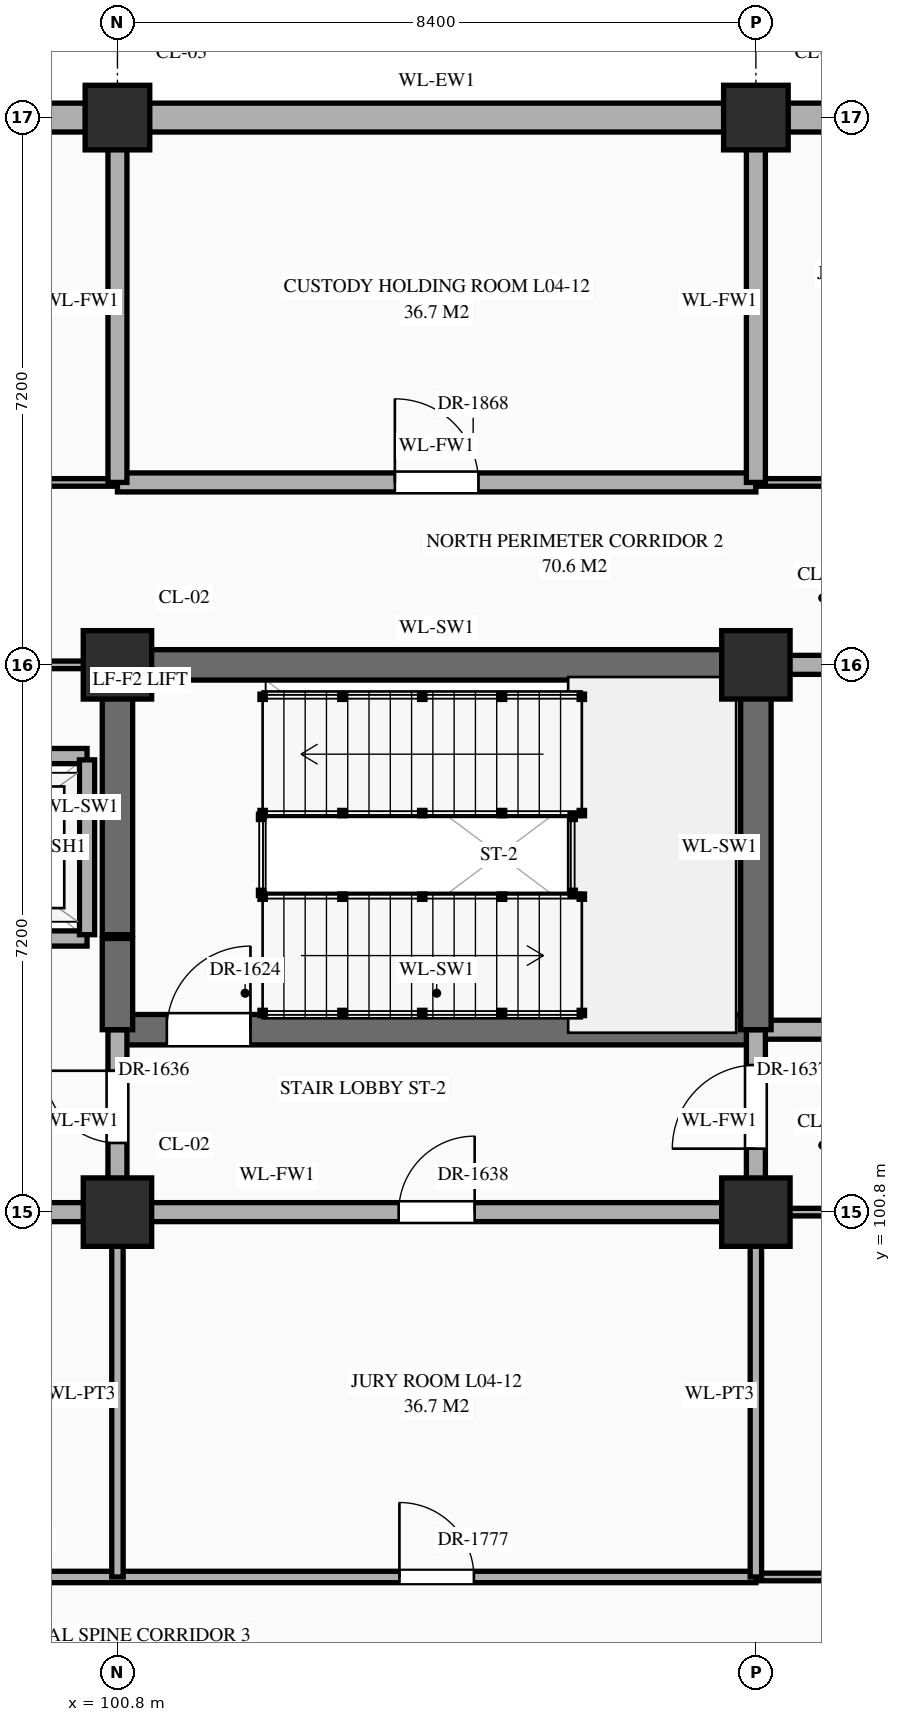
"""IFC4 building model, lengths in metres.
Left out: names, types, materials, properties, quantities, classifications, styles, units other than length and angle.
Written with IfcOpenShell. Run it as: python <this file> out.ifc"""

import sys

from ifc_helpers import new_model, si_unit, direction, frame, frame_2d, origin, origin_2d, place, context, subcontext, project, spatial, rectangle, extrude, element, fill, save


model = new_model("IFC4")
c1 = context("Model", 3, precision=1e-05, world=origin(), true_north=direction((0.0, 1.0)))
c2 = subcontext(c1, "Body", "Model", "MODEL_VIEW")
j1 = project(units=[si_unit("LENGTHUNIT", "METRE"), si_unit("PLANEANGLEUNIT", "RADIAN")], contexts=[c1])
p1 = place(None, origin())
s1 = spatial("IfcSite", under=j1, at=p1, CompositionType="ELEMENT")
p2 = place(p1, origin())
s2 = spatial("IfcBuilding", under=s1, at=p2, CompositionType="ELEMENT")
p3 = place(p2, frame((0.0, 0.0, 16.2)))
s3 = spatial("IfcBuildingStorey", under=s2, at=p3, CompositionType="ELEMENT", Elevation=16.2)
for number, where, z_axis, x_axis in (
    (1, (100.8, 100.8, 0.0), (0.0, 0.0, 1.0), (1.0, 0.0, 0.0)),
    (2, (100.8, 108.0, 0.0), (0.0, 0.0, 1.0), (1.0, 0.0, 0.0)),
):
    element("IfcColumn", number, at=place(p3, frame(where, z_axis=z_axis, x_axis=x_axis)), inside=s3, PredefinedType="COLUMN", context=c2, shape_type="SweptSolid", body=[
        extrude(rectangle(XDim=0.9, YDim=0.9, at=origin_2d()), origin(), (0.0, 0.0, 1.0), 5.4),
    ])
p4 = place(p3, frame((100.8, 115.2, 0.0), z_axis=(0.0, 0.0, 1.0), x_axis=(1.0, 0.0, 0.0)))
e3 = element("IfcColumn", 3, at=p4, inside=s3, PredefinedType="COLUMN", context=c2, shape_type="SweptSolid", body=[
    extrude(rectangle(XDim=0.85, YDim=0.85, at=origin_2d()), origin(), (0.0, 0.0, 1.0), 5.4),
])
for number, where, z_axis, x_axis in (
    (4, (109.2, 100.8, 0.0), (0.0, 0.0, 1.0), (1.0, 0.0, 0.0)),
    (5, (109.2, 108.0, 0.0), (0.0, 0.0, 1.0), (1.0, 0.0, 0.0)),
):
    element("IfcColumn", number, at=place(p3, frame(where, z_axis=z_axis, x_axis=x_axis)), inside=s3, PredefinedType="COLUMN", context=c2, shape_type="SweptSolid", body=[
        extrude(rectangle(XDim=0.9, YDim=0.9, at=origin_2d()), origin(), (0.0, 0.0, 1.0), 5.4),
    ])
p5 = place(p3, frame((109.2, 115.2, 0.0), z_axis=(0.0, 0.0, 1.0), x_axis=(1.0, 0.0, 0.0)))
e6 = element("IfcColumn", 6, at=p5, inside=s3, PredefinedType="COLUMN", context=c2, shape_type="SweptSolid", body=[
    extrude(rectangle(XDim=0.85, YDim=0.85, at=origin_2d()), origin(), (0.0, 0.0, 1.0), 5.4),
])
p6 = place(p3, frame((92.82, 115.2, 0.0), z_axis=(0.0, 0.0, 1.0), x_axis=(1.0, 0.0, 0.0)))
e7 = element("IfcWall", 7, at=p6, inside=s3, PredefinedType="STANDARD", context=c2, shape_type="SweptSolid", body=[
    extrude(rectangle(XDim=7.56, YDim=0.38, at=frame_2d((3.78, 0.0))), origin(), (0.0, 0.0, 1.0), 4.47),
])
p7 = place(p3, frame((101.22, 115.2, 0.0), z_axis=(0.0, 0.0, 1.0), x_axis=(1.0, 0.0, 0.0)))
e8 = element("IfcWall", 8, at=p7, inside=s3, PredefinedType="STANDARD", context=c2, shape_type="SweptSolid", body=[
    extrude(rectangle(XDim=7.56, YDim=0.38, at=frame_2d((3.78, 0.0))), origin(), (0.0, 0.0, 1.0), 4.47),
])
p8 = place(p3, frame((109.62, 115.2, 0.0), z_axis=(0.0, 0.0, 1.0), x_axis=(1.0, 0.0, 0.0)))
e9 = element("IfcWall", 9, at=p8, inside=s3, PredefinedType="STANDARD", context=c2, shape_type="SweptSolid", body=[
    extrude(rectangle(XDim=7.56, YDim=0.38, at=frame_2d((3.78, 0.0))), origin(), (0.0, 0.0, 1.0), 4.47),
])
p9 = place(p3, frame((89.8, 96.0, 0.0), z_axis=(0.0, 0.0, 1.0), x_axis=(1.0, 0.0, 0.0)))
e10 = element("IfcWall", 10, at=p9, inside=s3, PredefinedType="STANDARD", context=c2, shape_type="SweptSolid", body=[
    extrude(rectangle(XDim=19.4, YDim=0.15, at=frame_2d((9.7, 0.0))), origin(), (0.0, 0.0, 1.0), 5.12),
])
p10 = place(p9, frame((0.66, 0.0, 0.0)))
e11 = element("IfcOpeningElement", 11, at=p10, cuts=e10, PredefinedType="OPENING", context=c2, shape_type="SweptSolid", body=[
    extrude(rectangle(XDim=1.28, YDim=2.35, at=frame_2d((0.64, 1.175))), frame((0.0, 0.087, 0.0), z_axis=(0.0, -1.0, 0.0), x_axis=(1.0, 0.0, 0.0)), (0.0, 0.0, 1.0), 0.174),
])
p11 = place(p9, frame((6.33, 0.0, 0.0)))
e12 = element("IfcOpeningElement", 12, at=p11, cuts=e10, PredefinedType="OPENING", context=c2, shape_type="SweptSolid", body=[
    extrude(rectangle(XDim=0.94, YDim=2.3, at=frame_2d((0.47, 1.15))), frame((0.0, 0.087, 0.0), z_axis=(0.0, -1.0, 0.0), x_axis=(1.0, 0.0, 0.0)), (0.0, 0.0, 1.0), 0.174),
])
p12 = place(p9, frame((14.71, 0.0, 0.0)))
e13 = element("IfcOpeningElement", 13, at=p12, cuts=e10, PredefinedType="OPENING", context=c2, shape_type="SweptSolid", body=[
    extrude(rectangle(XDim=0.98, YDim=2.35, at=frame_2d((0.49, 1.175))), frame((0.0, 0.087, 0.0), z_axis=(0.0, -1.0, 0.0), x_axis=(1.0, 0.0, 0.0)), (0.0, 0.0, 1.0), 0.174),
])
p13 = place(p3, frame((109.2, 96.0, 0.0), z_axis=(0.0, 0.0, 1.0), x_axis=(1.0, 0.0, 0.0)))
e14 = element("IfcWall", 14, at=p13, inside=s3, PredefinedType="STANDARD", context=c2, shape_type="SweptSolid", body=[
    extrude(rectangle(XDim=5.8, YDim=0.1, at=frame_2d((2.9, 0.0))), origin(), (0.0, 0.0, 1.0), 5.12),
])
p14 = place(p13, frame((1.19, 0.0, 0.0)))
e15 = element("IfcOpeningElement", 15, at=p14, cuts=e14, PredefinedType="OPENING", context=c2, shape_type="SweptSolid", body=[
    extrude(rectangle(XDim=1.02, YDim=2.4, at=frame_2d((0.51, 1.2))), frame((0.0, 0.062, 0.0), z_axis=(0.0, -1.0, 0.0), x_axis=(1.0, 0.0, 0.0)), (0.0, 0.0, 1.0), 0.124),
])
p15 = place(p13, frame((4.07, 0.0, 0.0)))
e16 = element("IfcOpeningElement", 16, at=p15, cuts=e14, PredefinedType="OPENING", context=c2, shape_type="SweptSolid", body=[
    extrude(rectangle(XDim=1.06, YDim=2.4, at=frame_2d((0.53, 1.2))), frame((0.0, 0.062, 0.0), z_axis=(0.0, -1.0, 0.0), x_axis=(1.0, 0.0, 0.0)), (0.0, 0.0, 1.0), 0.124),
])
p16 = place(p3, frame((96.6, 100.8, 0.0), z_axis=(0.0, 0.0, 1.0), x_axis=(1.0, 0.0, 0.0)))
e17 = element("IfcWall", 17, at=p16, inside=s3, PredefinedType="STANDARD", context=c2, shape_type="SweptSolid", body=[
    extrude(rectangle(XDim=12.6, YDim=0.25, at=frame_2d((6.3, 0.0))), origin(), (0.0, 0.0, 1.0), 4.27),
])
p17 = place(p16, frame((7.9, 0.0, 0.0)))
e18 = element("IfcOpeningElement", 18, at=p17, cuts=e17, PredefinedType="OPENING", context=c2, shape_type="SweptSolid", body=[
    extrude(rectangle(XDim=1.0, YDim=2.2, at=frame_2d((0.5, 1.1))), frame((0.0, 0.137, 0.0), z_axis=(0.0, -1.0, 0.0), x_axis=(1.0, 0.0, 0.0)), (0.0, 0.0, 1.0), 0.274),
])
p18 = place(p3, frame((109.2, 100.8, 0.0), z_axis=(0.0, 0.0, 1.0), x_axis=(1.0, 0.0, 0.0)))
e19 = element("IfcWall", 19, at=p18, inside=s3, PredefinedType="STANDARD", context=c2, shape_type="SweptSolid", body=[
    extrude(rectangle(XDim=3.4, YDim=0.1, at=frame_2d((1.7, 0.0))), origin(), (0.0, 0.0, 1.0), 4.27),
])
p19 = place(p18, frame((1.265, 0.0, 0.0)))
e20 = element("IfcOpeningElement", 20, at=p19, cuts=e19, PredefinedType="OPENING", context=c2, shape_type="SweptSolid", body=[
    extrude(rectangle(XDim=1.24, YDim=2.3, at=frame_2d((0.62, 1.15))), frame((0.0, 0.062, 0.0), z_axis=(0.0, -1.0, 0.0), x_axis=(1.0, 0.0, 0.0)), (0.0, 0.0, 1.0), 0.124),
])
p20 = place(p3, frame((100.8, 103.2, 0.0), z_axis=(0.0, 0.0, 1.0), x_axis=(1.0, 0.0, 0.0)))
e21 = element("IfcWall", 21, at=p20, inside=s3, PredefinedType="SHEAR", context=c2, shape_type="SweptSolid", body=[
    extrude(rectangle(XDim=8.4, YDim=0.4, at=frame_2d((4.2, 0.0))), origin(), (0.0, 0.0, 1.0), 5.12),
])
p21 = place(p20, frame((0.65, 0.0, 0.0)))
e22 = element("IfcOpeningElement", 22, at=p21, cuts=e21, PredefinedType="OPENING", context=c2, shape_type="SweptSolid", body=[
    extrude(rectangle(XDim=1.1, YDim=2.2, at=frame_2d((0.55, 1.1))), frame((0.0, 0.212, 0.0), z_axis=(0.0, -1.0, 0.0), x_axis=(1.0, 0.0, 0.0)), (0.0, 0.0, 1.0), 0.424),
])
p22 = place(p3, frame((109.2, 103.2, 0.0), z_axis=(0.0, 0.0, 1.0), x_axis=(1.0, 0.0, 0.0)))
e23 = element("IfcWall", 23, at=p22, inside=s3, PredefinedType="STANDARD", context=c2, shape_type="SweptSolid", body=[
    extrude(rectangle(XDim=4.2, YDim=0.25, at=frame_2d((2.1, 0.0))), origin(), (0.0, 0.0, 1.0), 5.12),
])
p23 = place(p22, frame((1.6, 0.0, 0.0)))
e24 = element("IfcOpeningElement", 24, at=p23, cuts=e23, PredefinedType="OPENING", context=c2, shape_type="SweptSolid", body=[
    extrude(rectangle(XDim=1.0, YDim=2.2, at=frame_2d((0.5, 1.1))), frame((0.0, 0.137, 0.0), z_axis=(0.0, -1.0, 0.0), x_axis=(1.0, 0.0, 0.0)), (0.0, 0.0, 1.0), 0.274),
])
p24 = place(p3, frame((97.4, 104.4, 0.0), z_axis=(0.0, 0.0, 1.0), x_axis=(1.0, 0.0, 0.0)))
e25 = element("IfcWall", 25, at=p24, inside=s3, PredefinedType="STANDARD", context=c2, shape_type="SweptSolid", body=[
    extrude(rectangle(XDim=3.0, YDim=0.2, at=frame_2d((1.5, 0.0))), origin(), (0.0, 0.0, 1.0), 5.12),
])
p25 = place(p24, frame((0.9, 0.0, 0.0)))
e26 = element("IfcOpeningElement", 26, at=p25, cuts=e25, PredefinedType="OPENING", context=c2, shape_type="SweptSolid", body=[
    extrude(rectangle(XDim=1.2, YDim=2.15, at=frame_2d((0.6, 1.075))), frame((0.0, 0.112, 0.0), z_axis=(0.0, -1.0, 0.0), x_axis=(1.0, 0.0, 0.0)), (0.0, 0.0, 1.0), 0.224),
])
p26 = place(p3, frame((97.4, 106.8, 0.0), z_axis=(0.0, 0.0, 1.0), x_axis=(1.0, 0.0, 0.0)))
e27 = element("IfcWall", 27, at=p26, inside=s3, PredefinedType="STANDARD", context=c2, shape_type="SweptSolid", body=[
    extrude(rectangle(XDim=3.0, YDim=0.2, at=frame_2d((1.5, 0.0))), origin(), (0.0, 0.0, 1.0), 5.12),
])
p27 = place(p3, frame((96.65, 108.0, 0.0), z_axis=(0.0, 0.0, 1.0), x_axis=(1.0, 0.0, 0.0)))
e28 = element("IfcWall", 28, at=p27, inside=s3, PredefinedType="STANDARD", context=c2, shape_type="SweptSolid", body=[
    extrude(rectangle(XDim=4.1, YDim=0.1, at=frame_2d((2.05, 0.0))), origin(), (0.0, 0.0, 1.0), 4.27),
])
p28 = place(p3, frame((100.8, 108.0, 0.0), z_axis=(0.0, 0.0, 1.0), x_axis=(1.0, 0.0, 0.0)))
e29 = element("IfcWall", 29, at=p28, inside=s3, PredefinedType="SHEAR", context=c2, shape_type="SweptSolid", body=[
    extrude(rectangle(XDim=8.4, YDim=0.4, at=frame_2d((4.2, 0.0))), origin(), (0.0, 0.0, 1.0), 5.12),
])
p29 = place(p3, frame((109.2, 108.0, 0.0), z_axis=(0.0, 0.0, 1.0), x_axis=(1.0, 0.0, 0.0)))
e30 = element("IfcWall", 30, at=p29, inside=s3, PredefinedType="STANDARD", context=c2, shape_type="SweptSolid", body=[
    extrude(rectangle(XDim=4.2, YDim=0.25, at=frame_2d((2.1, 0.0))), origin(), (0.0, 0.0, 1.0), 4.27),
])
p30 = place(p29, frame((1.785, 0.0, 0.0)))
e31 = element("IfcOpeningElement", 31, at=p30, cuts=e30, PredefinedType="OPENING", context=c2, shape_type="SweptSolid", body=[
    extrude(rectangle(XDim=1.0, YDim=2.2, at=frame_2d((0.5, 1.1))), frame((0.0, 0.137, 0.0), z_axis=(0.0, -1.0, 0.0), x_axis=(1.0, 0.0, 0.0)), (0.0, 0.0, 1.0), 0.274),
])
p31 = place(p3, frame((67.2, 110.4, 0.0), z_axis=(0.0, 0.0, 1.0), x_axis=(1.0, 0.0, 0.0)))
e32 = element("IfcWall", 32, at=p31, inside=s3, PredefinedType="STANDARD", context=c2, shape_type="SweptSolid", body=[
    extrude(rectangle(XDim=33.6, YDim=0.1, at=frame_2d((16.8, 0.0))), origin(), (0.0, 0.0, 1.0), 5.12),
])
p32 = place(p31, frame((3.67, 0.0, 0.0)))
e33 = element("IfcOpeningElement", 33, at=p32, cuts=e32, PredefinedType="OPENING", context=c2, shape_type="SweptSolid", body=[
    extrude(rectangle(XDim=1.06, YDim=2.4, at=frame_2d((0.53, 1.2))), frame((0.0, 0.062, 0.0), z_axis=(0.0, -1.0, 0.0), x_axis=(1.0, 0.0, 0.0)), (0.0, 0.0, 1.0), 0.124),
])
p33 = place(p31, frame((12.03, 0.0, 0.0)))
e34 = element("IfcOpeningElement", 34, at=p33, cuts=e32, PredefinedType="OPENING", context=c2, shape_type="SweptSolid", body=[
    extrude(rectangle(XDim=1.14, YDim=2.4, at=frame_2d((0.57, 1.2))), frame((0.0, 0.062, 0.0), z_axis=(0.0, -1.0, 0.0), x_axis=(1.0, 0.0, 0.0)), (0.0, 0.0, 1.0), 0.124),
])
p34 = place(p31, frame((20.55, 0.0, 0.0)))
e35 = element("IfcOpeningElement", 35, at=p34, cuts=e32, PredefinedType="OPENING", context=c2, shape_type="SweptSolid", body=[
    extrude(rectangle(XDim=0.9, YDim=2.15, at=frame_2d((0.45, 1.075))), frame((0.0, 0.062, 0.0), z_axis=(0.0, -1.0, 0.0), x_axis=(1.0, 0.0, 0.0)), (0.0, 0.0, 1.0), 0.124),
])
p35 = place(p31, frame((28.97, 0.0, 0.0)))
e36 = element("IfcOpeningElement", 36, at=p35, cuts=e32, PredefinedType="OPENING", context=c2, shape_type="SweptSolid", body=[
    extrude(rectangle(XDim=0.86, YDim=2.1, at=frame_2d((0.43, 1.05))), frame((0.0, 0.062, 0.0), z_axis=(0.0, -1.0, 0.0), x_axis=(1.0, 0.0, 0.0)), (0.0, 0.0, 1.0), 0.124),
])
p36 = place(p3, frame((100.8, 110.4, 0.0), z_axis=(0.0, 0.0, 1.0), x_axis=(1.0, 0.0, 0.0)))
e37 = element("IfcWall", 37, at=p36, inside=s3, PredefinedType="STANDARD", context=c2, shape_type="SweptSolid", body=[
    extrude(rectangle(XDim=8.4, YDim=0.25, at=frame_2d((4.2, 0.0))), origin(), (0.0, 0.0, 1.0), 5.12),
])
p37 = place(p36, frame((3.65, 0.0, 0.0)))
e38 = element("IfcOpeningElement", 38, at=p37, cuts=e37, PredefinedType="OPENING", context=c2, shape_type="SweptSolid", body=[
    extrude(rectangle(XDim=1.1, YDim=2.2, at=frame_2d((0.55, 1.1))), frame((0.0, 0.137, 0.0), z_axis=(0.0, -1.0, 0.0), x_axis=(1.0, 0.0, 0.0)), (0.0, 0.0, 1.0), 0.274),
])
p38 = place(p3, frame((109.2, 110.4, 0.0), z_axis=(0.0, 0.0, 1.0), x_axis=(1.0, 0.0, 0.0)))
e39 = element("IfcWall", 39, at=p38, inside=s3, PredefinedType="STANDARD", context=c2, shape_type="SweptSolid", body=[
    extrude(rectangle(XDim=8.36, YDim=0.1, at=frame_2d((4.18, 0.0))), origin(), (0.0, 0.0, 1.0), 5.12),
])
p39 = place(p38, frame((3.7, 0.0, 0.0)))
e40 = element("IfcOpeningElement", 40, at=p39, cuts=e39, PredefinedType="OPENING", context=c2, shape_type="SweptSolid", body=[
    extrude(rectangle(XDim=0.96, YDim=2.2, at=frame_2d((0.48, 1.1))), frame((0.0, 0.062, 0.0), z_axis=(0.0, -1.0, 0.0), x_axis=(1.0, 0.0, 0.0)), (0.0, 0.0, 1.0), 0.124),
])
p40 = place(p3, frame((100.4, 104.45, 0.0), z_axis=(0.0, 0.0, 1.0), x_axis=(0.0, 1.0, 0.0)))
e41 = element("IfcWall", 41, at=p40, inside=s3, PredefinedType="STANDARD", context=c2, shape_type="SweptSolid", body=[
    extrude(rectangle(XDim=2.3, YDim=0.2, at=frame_2d((1.15, 0.0))), origin(), (0.0, 0.0, 1.0), 5.12),
])
p41 = place(p3, frame((100.8, 96.0, 0.0), z_axis=(0.0, 0.0, 1.0), x_axis=(0.0, 1.0, 0.0)))
e42 = element("IfcWall", 42, at=p41, inside=s3, PredefinedType="STANDARD", context=c2, shape_type="SweptSolid", body=[
    extrude(rectangle(XDim=4.8, YDim=0.15, at=frame_2d((2.4, 0.0))), origin(), (0.0, 0.0, 1.0), 4.37),
])
p42 = place(p3, frame((100.8, 100.8, 0.0), z_axis=(0.0, 0.0, 1.0), x_axis=(0.0, 1.0, 0.0)))
e43 = element("IfcWall", 43, at=p42, inside=s3, PredefinedType="STANDARD", context=c2, shape_type="SweptSolid", body=[
    extrude(rectangle(XDim=2.4, YDim=0.25, at=frame_2d((1.2, 0.0))), origin(), (0.0, 0.0, 1.0), 4.37),
])
p43 = place(p42, frame((0.91, 0.0, 0.0)))
e44 = element("IfcOpeningElement", 44, at=p43, cuts=e43, PredefinedType="OPENING", context=c2, shape_type="SweptSolid", body=[
    extrude(rectangle(XDim=0.95, YDim=2.15, at=frame_2d((0.475, 1.075))), frame((0.0, 0.137, 0.0), z_axis=(0.0, -1.0, 0.0), x_axis=(1.0, 0.0, 0.0)), (0.0, 0.0, 1.0), 0.274),
])
p44 = place(p3, frame((100.8, 103.2, 0.0), z_axis=(0.0, 0.0, 1.0), x_axis=(0.0, 1.0, 0.0)))
e45 = element("IfcWall", 45, at=p44, inside=s3, PredefinedType="SHEAR", context=c2, shape_type="SweptSolid", body=[
    extrude(rectangle(XDim=1.2, YDim=0.4, at=frame_2d((0.6, 0.0))), origin(), (0.0, 0.0, 1.0), 5.12),
])
p45 = place(p3, frame((100.8, 104.45, 0.0), z_axis=(0.0, 0.0, 1.0), x_axis=(0.0, 1.0, 0.0)))
e46 = element("IfcWall", 46, at=p45, inside=s3, PredefinedType="SHEAR", context=c2, shape_type="SweptSolid", body=[
    extrude(rectangle(XDim=3.5, YDim=0.4, at=frame_2d((1.75, 0.0))), origin(), (0.0, 0.0, 1.0), 5.12),
])
p46 = place(p3, frame((100.8, 110.4, 0.0), z_axis=(0.0, 0.0, 1.0), x_axis=(0.0, 1.0, 0.0)))
e47 = element("IfcWall", 47, at=p46, inside=s3, PredefinedType="STANDARD", context=c2, shape_type="SweptSolid", body=[
    extrude(rectangle(XDim=4.76, YDim=0.25, at=frame_2d((2.38, 0.0))), origin(), (0.0, 0.0, 1.0), 4.37),
])
p47 = place(p3, frame((109.2, 96.0, 0.0), z_axis=(0.0, 0.0, 1.0), x_axis=(0.0, 1.0, 0.0)))
e48 = element("IfcWall", 48, at=p47, inside=s3, PredefinedType="STANDARD", context=c2, shape_type="SweptSolid", body=[
    extrude(rectangle(XDim=4.8, YDim=0.15, at=frame_2d((2.4, 0.0))), origin(), (0.0, 0.0, 1.0), 4.37),
])
p48 = place(p3, frame((109.2, 100.8, 0.0), z_axis=(0.0, 0.0, 1.0), x_axis=(0.0, 1.0, 0.0)))
e49 = element("IfcWall", 49, at=p48, inside=s3, PredefinedType="STANDARD", context=c2, shape_type="SweptSolid", body=[
    extrude(rectangle(XDim=2.4, YDim=0.25, at=frame_2d((1.2, 0.0))), origin(), (0.0, 0.0, 1.0), 4.37),
])
p49 = place(p48, frame((0.835, 0.0, 0.0)))
e50 = element("IfcOpeningElement", 50, at=p49, cuts=e49, PredefinedType="OPENING", context=c2, shape_type="SweptSolid", body=[
    extrude(rectangle(XDim=1.1, YDim=2.2, at=frame_2d((0.55, 1.1))), frame((0.0, 0.137, 0.0), z_axis=(0.0, -1.0, 0.0), x_axis=(1.0, 0.0, 0.0)), (0.0, 0.0, 1.0), 0.274),
])
p50 = place(p3, frame((109.2, 103.2, 0.0), z_axis=(0.0, 0.0, 1.0), x_axis=(0.0, 1.0, 0.0)))
e51 = element("IfcWall", 51, at=p50, inside=s3, PredefinedType="SHEAR", context=c2, shape_type="SweptSolid", body=[
    extrude(rectangle(XDim=4.8, YDim=0.4, at=frame_2d((2.4, 0.0))), origin(), (0.0, 0.0, 1.0), 5.12),
])
p51 = place(p3, frame((109.2, 110.4, 0.0), z_axis=(0.0, 0.0, 1.0), x_axis=(0.0, 1.0, 0.0)))
e52 = element("IfcWall", 52, at=p51, inside=s3, PredefinedType="STANDARD", context=c2, shape_type="SweptSolid", body=[
    extrude(rectangle(XDim=4.76, YDim=0.25, at=frame_2d((2.38, 0.0))), origin(), (0.0, 0.0, 1.0), 4.37),
])
p52 = place(p21, origin())
e53 = element("IfcDoor", 53, at=p52, inside=s3, OperationType="SINGLE_SWING_RIGHT", PredefinedType="DOOR", context=c2, shape_type="SweptSolid", body=[
    extrude(rectangle(XDim=1.1, YDim=2.2, at=frame_2d((0.55, 1.1))), frame((0.0, 0.025, 0.0), z_axis=(0.0, -1.0, 0.0), x_axis=(1.0, 0.0, 0.0)), (0.0, 0.0, 1.0), 0.05),
])
fill(e22, e53)
p53 = place(p43, origin())
e54 = element("IfcDoor", 54, at=p53, inside=s3, OperationType="SINGLE_SWING_RIGHT", PredefinedType="DOOR", context=c2, shape_type="SweptSolid", body=[
    extrude(rectangle(XDim=0.95, YDim=2.15, at=frame_2d((0.475, 1.075))), frame((0.0, 0.025, 0.0), z_axis=(0.0, -1.0, 0.0), x_axis=(1.0, 0.0, 0.0)), (0.0, 0.0, 1.0), 0.05),
])
fill(e44, e54)
p54 = place(p49, origin())
e55 = element("IfcDoor", 55, at=p54, inside=s3, OperationType="SINGLE_SWING_LEFT", PredefinedType="DOOR", context=c2, shape_type="SweptSolid", body=[
    extrude(rectangle(XDim=1.1, YDim=2.2, at=frame_2d((0.55, 1.1))), frame((0.0, 0.025, 0.0), z_axis=(0.0, -1.0, 0.0), x_axis=(1.0, 0.0, 0.0)), (0.0, 0.0, 1.0), 0.05),
])
fill(e50, e55)
p55 = place(p17, origin())
e56 = element("IfcDoor", 56, at=p55, inside=s3, OperationType="SINGLE_SWING_RIGHT", PredefinedType="DOOR", context=c2, shape_type="SweptSolid", body=[
    extrude(rectangle(XDim=1.0, YDim=2.2, at=frame_2d((0.5, 1.1))), frame((0.0, 0.025, 0.0), z_axis=(0.0, -1.0, 0.0), x_axis=(1.0, 0.0, 0.0)), (0.0, 0.0, 1.0), 0.05),
])
fill(e18, e56)
p56 = place(p12, origin())
e57 = element("IfcDoor", 57, at=p56, inside=s3, OperationType="SINGLE_SWING_LEFT", PredefinedType="DOOR", context=c2, shape_type="SweptSolid", body=[
    extrude(rectangle(XDim=0.98, YDim=2.35, at=frame_2d((0.49, 1.175))), frame((0.0, 0.025, 0.0), z_axis=(0.0, -1.0, 0.0), x_axis=(1.0, 0.0, 0.0)), (0.0, 0.0, 1.0), 0.05),
])
fill(e13, e57)
p57 = place(p37, origin())
e58 = element("IfcDoor", 58, at=p57, inside=s3, OperationType="SINGLE_SWING_LEFT", PredefinedType="DOOR", context=c2, shape_type="SweptSolid", body=[
    extrude(rectangle(XDim=1.1, YDim=2.2, at=frame_2d((0.55, 1.1))), frame((0.0, 0.025, 0.0), z_axis=(0.0, -1.0, 0.0), x_axis=(1.0, 0.0, 0.0)), (0.0, 0.0, 1.0), 0.05),
])
fill(e38, e58)
save(model, sys.argv[1])
